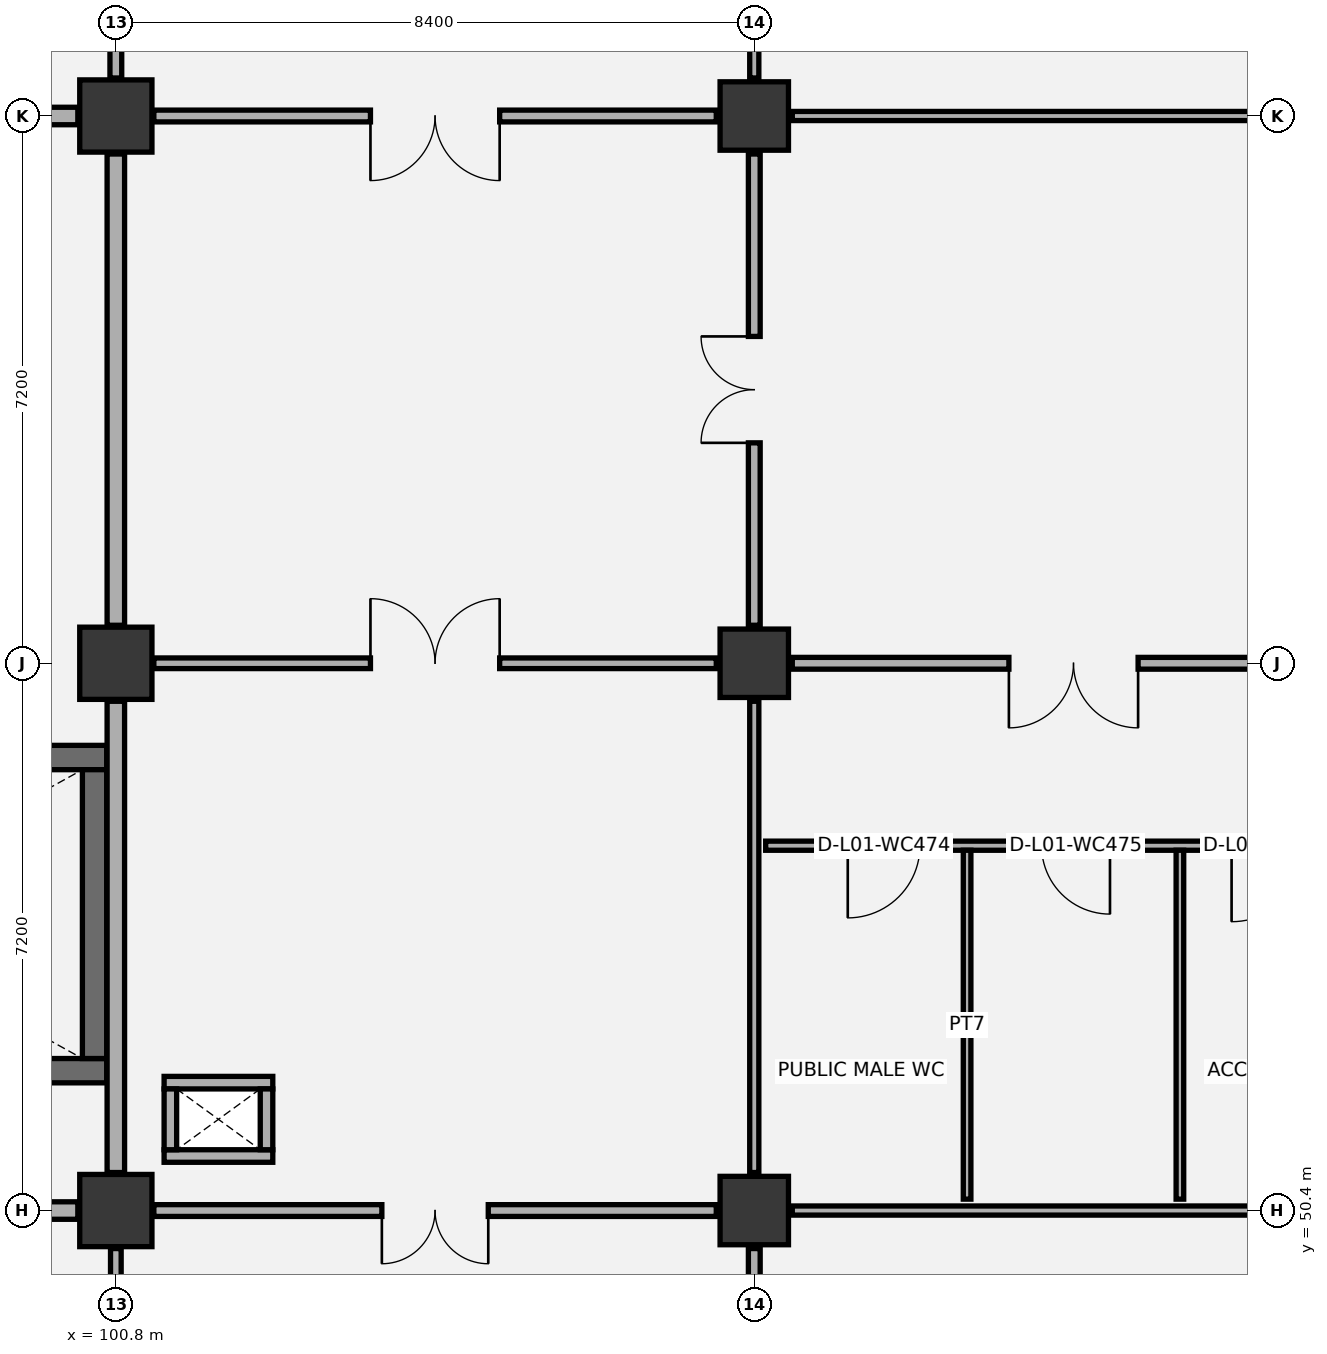
"""IFC4 building model, lengths in metres.
Left out: names, types, materials, properties, quantities, classifications, styles, units other than length and angle.
Written with IfcOpenShell. Run it as: python <this file> out.ifc"""

import sys

from ifc_helpers import new_model, si_unit, direction, frame, frame_2d, origin, origin_2d, place, context, subcontext, project, spatial, rectangle, extrude, element, fill, save


model = new_model("IFC4")
c1 = context("Model", 3, precision=1e-05, world=origin(), true_north=direction((0.0, 1.0)))
c2 = subcontext(c1, "Body", "Model", "MODEL_VIEW")
j1 = project(units=[si_unit("LENGTHUNIT", "METRE"), si_unit("PLANEANGLEUNIT", "RADIAN")], contexts=[c1])
p1 = place(None, origin())
s1 = spatial("IfcSite", under=j1, at=p1, CompositionType="ELEMENT")
p2 = place(p1, origin())
s2 = spatial("IfcBuilding", under=s1, at=p2, CompositionType="ELEMENT")
p3 = place(p2, frame((0.0, 0.0, 6.0)))
s3 = spatial("IfcBuildingStorey", under=s2, at=p3, CompositionType="ELEMENT", Elevation=6.0)
for number, where, z_axis, x_axis in (
    (1, (100.8, 50.4, 0.0), (0.0, 0.0, 1.0), (1.0, 0.0, 0.0)),
    (2, (100.8, 57.6, 0.0), (0.0, 0.0, 1.0), (1.0, 0.0, 0.0)),
    (3, (100.8, 64.8, 0.0), (0.0, 0.0, 1.0), (1.0, 0.0, 0.0)),
):
    element("IfcColumn", number, at=place(p3, frame(where, z_axis=z_axis, x_axis=x_axis)), inside=s3, PredefinedType="COLUMN", context=c2, shape_type="SweptSolid", body=[
        extrude(rectangle(XDim=0.95, YDim=0.95, at=origin_2d()), origin(), (0.0, 0.0, 1.0), 5.4),
    ])
for number, where, z_axis, x_axis in (
    (4, (109.2, 50.4, 0.0), (0.0, 0.0, 1.0), (1.0, 0.0, 0.0)),
    (5, (109.2, 57.6, 0.0), (0.0, 0.0, 1.0), (1.0, 0.0, 0.0)),
    (6, (109.2, 64.8, 0.0), (0.0, 0.0, 1.0), (1.0, 0.0, 0.0)),
):
    element("IfcColumn", number, at=place(p3, frame(where, z_axis=z_axis, x_axis=x_axis)), inside=s3, PredefinedType="COLUMN", context=c2, shape_type="SweptSolid", body=[
        extrude(rectangle(XDim=0.9, YDim=0.9, at=origin_2d()), origin(), (0.0, 0.0, 1.0), 5.4),
    ])
p4 = place(p3, frame((93.2, 52.24, 0.0), z_axis=(0.0, 0.0, 1.0), x_axis=(1.0, 0.0, 0.0)))
e7 = element("IfcWall", 7, at=p4, inside=s3, PredefinedType="SHEAR", context=c2, shape_type="SweptSolid", body=[
    extrude(rectangle(XDim=7.48, YDim=0.32, at=frame_2d((3.74, 0.0))), origin(), (0.0, 0.0, 1.0), 5.075),
])
p5 = place(p4, frame((0.45, 0.0, 0.0)))
e8 = element("IfcOpeningElement", 8, at=p5, cuts=e7, PredefinedType="OPENING", context=c2, shape_type="SweptSolid", body=[
    extrude(rectangle(XDim=1.05, YDim=2.15, at=frame_2d((0.525, 1.075))), frame((0.0, 0.17, 0.0), z_axis=(0.0, -1.0, 0.0), x_axis=(1.0, 0.0, 0.0)), (0.0, 0.0, 1.0), 0.34),
])
p6 = place(p3, frame((93.2, 56.36, 0.0), z_axis=(0.0, 0.0, 1.0), x_axis=(1.0, 0.0, 0.0)))
e9 = element("IfcWall", 9, at=p6, inside=s3, PredefinedType="SHEAR", context=c2, shape_type="SweptSolid", body=[
    extrude(rectangle(XDim=7.48, YDim=0.32, at=frame_2d((3.74, 0.0))), origin(), (0.0, 0.0, 1.0), 5.075),
])
p7 = place(p3, frame((100.52, 52.4, 0.0), z_axis=(0.0, 0.0, 1.0), x_axis=(0.0, 1.0, 0.0)))
e10 = element("IfcWall", 10, at=p7, inside=s3, PredefinedType="SHEAR", context=c2, shape_type="SweptSolid", body=[
    extrude(rectangle(XDim=3.8, YDim=0.32, at=frame_2d((1.9, 0.0))), origin(), (0.0, 0.0, 1.0), 5.075),
])
for number, where, z_axis, x_axis in (
    (11, (101.435, 51.117, 0.0), (0.0, 0.0, 1.0), (1.0, 0.0, 0.0)),
    (12, (101.435, 52.083, 0.0), (0.0, 0.0, 1.0), (1.0, 0.0, 0.0)),
):
    element("IfcWall", number, at=place(p3, frame(where, z_axis=z_axis, x_axis=x_axis)), inside=s3, PredefinedType="PARTITIONING", context=c2, shape_type="SweptSolid", body=[
        extrude(rectangle(XDim=1.43, YDim=0.165, at=frame_2d((0.715, 0.0))), origin(), (0.0, 0.0, 1.0), 5.075),
    ])
for number, where, z_axis, x_axis in (
    (13, (101.518, 51.2, 0.0), (0.0, 0.0, 1.0), (0.0, 1.0, 0.0)),
    (14, (102.782, 51.2, 0.0), (0.0, 0.0, 1.0), (0.0, 1.0, 0.0)),
):
    element("IfcWall", number, at=place(p3, frame(where, z_axis=z_axis, x_axis=x_axis)), inside=s3, PredefinedType="PARTITIONING", context=c2, shape_type="SweptSolid", body=[
        extrude(rectangle(XDim=0.8, YDim=0.165, at=frame_2d((0.4, 0.0))), origin(), (0.0, 0.0, 1.0), 5.075),
    ])
p8 = place(p3, frame((109.35, 55.2, 0.0), z_axis=(0.0, 0.0, 1.0), x_axis=(1.0, 0.0, 0.0)))
e15 = element("IfcWall", 15, at=p8, inside=s3, PredefinedType="PARTITIONING", context=c2, shape_type="SweptSolid", body=[
    extrude(rectangle(XDim=8.1, YDim=0.12, at=frame_2d((4.05, 0.0))), origin(), (0.0, 0.0, 1.0), 5.075),
])
p9 = place(p8, frame((1.08, 0.0, 0.0)))
e16 = element("IfcOpeningElement", 16, at=p9, cuts=e15, PredefinedType="OPENING", context=c2, shape_type="SweptSolid", body=[
    extrude(rectangle(XDim=0.95, YDim=2.1, at=frame_2d((0.475, 1.05))), frame((0.0, 0.07, 0.0), z_axis=(0.0, -1.0, 0.0), x_axis=(1.0, 0.0, 0.0)), (0.0, 0.0, 1.0), 0.14),
])
p10 = place(p8, frame((3.63, 0.0, 0.0)))
e17 = element("IfcOpeningElement", 17, at=p10, cuts=e15, PredefinedType="OPENING", context=c2, shape_type="SweptSolid", body=[
    extrude(rectangle(XDim=0.9, YDim=2.1, at=frame_2d((0.45, 1.05))), frame((0.0, 0.07, 0.0), z_axis=(0.0, -1.0, 0.0), x_axis=(1.0, 0.0, 0.0)), (0.0, 0.0, 1.0), 0.14),
])
p11 = place(p8, frame((6.13, 0.0, 0.0)))
e18 = element("IfcOpeningElement", 18, at=p11, cuts=e15, PredefinedType="OPENING", context=c2, shape_type="SweptSolid", body=[
    extrude(rectangle(XDim=1.0, YDim=2.1, at=frame_2d((0.5, 1.05))), frame((0.0, 0.07, 0.0), z_axis=(0.0, -1.0, 0.0), x_axis=(1.0, 0.0, 0.0)), (0.0, 0.0, 1.0), 0.14),
])
for number, where, z_axis, x_axis in (
    (19, (112.0, 50.55, 0.0), (0.0, 0.0, 1.0), (0.0, 1.0, 0.0)),
    (20, (114.8, 50.55, 0.0), (0.0, 0.0, 1.0), (0.0, 1.0, 0.0)),
):
    element("IfcWall", number, at=place(p3, frame(where, z_axis=z_axis, x_axis=x_axis)), inside=s3, PredefinedType="PARTITIONING", context=c2, shape_type="SweptSolid", body=[
        extrude(rectangle(XDim=4.59, YDim=0.1, at=frame_2d((2.295, 0.0))), origin(), (0.0, 0.0, 1.0), 5.075),
    ])
p12 = place(p3, frame((100.8, 43.7, 0.0), z_axis=(0.0, 0.0, 1.0), x_axis=(0.0, 1.0, 0.0)))
e21 = element("IfcWall", 21, at=p12, inside=s3, PredefinedType="PARTITIONING", context=c2, shape_type="SweptSolid", body=[
    extrude(rectangle(XDim=6.2, YDim=0.14, at=frame_2d((3.1, 0.0))), origin(), (0.0, 0.0, 1.0), 4.32),
])
p13 = place(p12, frame((2.4, 0.0, 0.0)))
e22 = element("IfcOpeningElement", 22, at=p13, cuts=e21, PredefinedType="OPENING", context=c2, shape_type="SweptSolid", body=[
    extrude(rectangle(XDim=1.4, YDim=2.15, at=frame_2d((0.7, 1.075))), frame((0.0, 0.08, 0.0), z_axis=(0.0, -1.0, 0.0), x_axis=(1.0, 0.0, 0.0)), (0.0, 0.0, 1.0), 0.16),
])
p14 = place(p3, frame((92.9, 50.4, 0.0), z_axis=(0.0, 0.0, 1.0), x_axis=(1.0, 0.0, 0.0)))
e23 = element("IfcWall", 23, at=p14, inside=s3, PredefinedType="PARTITIONING", context=c2, shape_type="SweptSolid", body=[
    extrude(rectangle(XDim=7.4, YDim=0.23, at=frame_2d((3.7, 0.0))), origin(), (0.0, 0.0, 1.0), 4.27),
])
p15 = place(p14, frame((2.95, 0.0, 0.0)))
e24 = element("IfcOpeningElement", 24, at=p15, cuts=e23, PredefinedType="OPENING", context=c2, shape_type="SweptSolid", body=[
    extrude(rectangle(XDim=1.5, YDim=2.15, at=frame_2d((0.75, 1.075))), frame((0.0, 0.125, 0.0), z_axis=(0.0, -1.0, 0.0), x_axis=(1.0, 0.0, 0.0)), (0.0, 0.0, 1.0), 0.25),
])
p16 = place(p3, frame((100.8, 50.9, 0.0), z_axis=(0.0, 0.0, 1.0), x_axis=(0.0, 1.0, 0.0)))
e25 = element("IfcWall", 25, at=p16, inside=s3, PredefinedType="PARTITIONING", context=c2, shape_type="SweptSolid", body=[
    extrude(rectangle(XDim=6.2, YDim=0.23, at=frame_2d((3.1, 0.0))), origin(), (0.0, 0.0, 1.0), 4.78),
])
p17 = place(p3, frame((100.8, 58.1, 0.0), z_axis=(0.0, 0.0, 1.0), x_axis=(0.0, 1.0, 0.0)))
e26 = element("IfcWall", 26, at=p17, inside=s3, PredefinedType="PARTITIONING", context=c2, shape_type="SweptSolid", body=[
    extrude(rectangle(XDim=6.2, YDim=0.23, at=frame_2d((3.1, 0.0))), origin(), (0.0, 0.0, 1.0), 4.32),
])
p18 = place(p3, frame((92.9, 64.8, 0.0), z_axis=(0.0, 0.0, 1.0), x_axis=(1.0, 0.0, 0.0)))
e27 = element("IfcWall", 27, at=p18, inside=s3, PredefinedType="PARTITIONING", context=c2, shape_type="SweptSolid", body=[
    extrude(rectangle(XDim=7.4, YDim=0.23, at=frame_2d((3.7, 0.0))), origin(), (0.0, 0.0, 1.0), 4.27),
])
p19 = place(p3, frame((100.8, 65.3, 0.0), z_axis=(0.0, 0.0, 1.0), x_axis=(0.0, 1.0, 0.0)))
e28 = element("IfcWall", 28, at=p19, inside=s3, PredefinedType="PARTITIONING", context=c2, shape_type="SweptSolid", body=[
    extrude(rectangle(XDim=6.2, YDim=0.155, at=frame_2d((3.1, 0.0))), origin(), (0.0, 0.0, 1.0), 4.57),
])
p20 = place(p19, frame((2.4, 0.0, 0.0)))
e29 = element("IfcOpeningElement", 29, at=p20, cuts=e28, PredefinedType="OPENING", context=c2, shape_type="SweptSolid", body=[
    extrude(rectangle(XDim=1.4, YDim=2.15, at=frame_2d((0.7, 1.075))), frame((0.0, 0.087, 0.0), z_axis=(0.0, -1.0, 0.0), x_axis=(1.0, 0.0, 0.0)), (0.0, 0.0, 1.0), 0.175),
])
p21 = place(p3, frame((109.2, 43.7, 0.0), z_axis=(0.0, 0.0, 1.0), x_axis=(0.0, 1.0, 0.0)))
e30 = element("IfcWall", 30, at=p21, inside=s3, PredefinedType="PARTITIONING", context=c2, shape_type="SweptSolid", body=[
    extrude(rectangle(XDim=6.2, YDim=0.155, at=frame_2d((3.1, 0.0))), origin(), (0.0, 0.0, 1.0), 4.78),
])
p22 = place(p21, frame((2.25, 0.0, 0.0)))
e31 = element("IfcOpeningElement", 31, at=p22, cuts=e30, PredefinedType="OPENING", context=c2, shape_type="SweptSolid", body=[
    extrude(rectangle(XDim=1.7, YDim=2.25, at=frame_2d((0.85, 1.125))), frame((0.0, 0.087, 0.0), z_axis=(0.0, -1.0, 0.0), x_axis=(1.0, 0.0, 0.0)), (0.0, 0.0, 1.0), 0.175),
])
p23 = place(p3, frame((101.3, 50.4, 0.0), z_axis=(0.0, 0.0, 1.0), x_axis=(1.0, 0.0, 0.0)))
e32 = element("IfcWall", 32, at=p23, inside=s3, PredefinedType="PARTITIONING", context=c2, shape_type="SweptSolid", body=[
    extrude(rectangle(XDim=7.4, YDim=0.155, at=frame_2d((3.7, 0.0))), origin(), (0.0, 0.0, 1.0), 4.27),
])
p24 = place(p23, frame((3.0, 0.0, 0.0)))
e33 = element("IfcOpeningElement", 33, at=p24, cuts=e32, PredefinedType="OPENING", context=c2, shape_type="SweptSolid", body=[
    extrude(rectangle(XDim=1.4, YDim=2.15, at=frame_2d((0.7, 1.075))), frame((0.0, 0.087, 0.0), z_axis=(0.0, -1.0, 0.0), x_axis=(1.0, 0.0, 0.0)), (0.0, 0.0, 1.0), 0.175),
])
p25 = place(p3, frame((109.2, 50.9, 0.0), z_axis=(0.0, 0.0, 1.0), x_axis=(0.0, 1.0, 0.0)))
e34 = element("IfcWall", 34, at=p25, inside=s3, PredefinedType="PARTITIONING", context=c2, shape_type="SweptSolid", body=[
    extrude(rectangle(XDim=6.2, YDim=0.12, at=frame_2d((3.1, 0.0))), origin(), (0.0, 0.0, 1.0), 4.32),
])
p26 = place(p3, frame((101.3, 57.6, 0.0), z_axis=(0.0, 0.0, 1.0), x_axis=(1.0, 0.0, 0.0)))
e35 = element("IfcWall", 35, at=p26, inside=s3, PredefinedType="PARTITIONING", context=c2, shape_type="SweptSolid", body=[
    extrude(rectangle(XDim=7.4, YDim=0.14, at=frame_2d((3.7, 0.0))), origin(), (0.0, 0.0, 1.0), 4.27),
])
p27 = place(p26, frame((2.85, 0.0, 0.0)))
e36 = element("IfcOpeningElement", 36, at=p27, cuts=e35, PredefinedType="OPENING", context=c2, shape_type="SweptSolid", body=[
    extrude(rectangle(XDim=1.7, YDim=2.25, at=frame_2d((0.85, 1.125))), frame((0.0, 0.08, 0.0), z_axis=(0.0, -1.0, 0.0), x_axis=(1.0, 0.0, 0.0)), (0.0, 0.0, 1.0), 0.16),
])
p28 = place(p3, frame((109.2, 58.1, 0.0), z_axis=(0.0, 0.0, 1.0), x_axis=(0.0, 1.0, 0.0)))
e37 = element("IfcWall", 37, at=p28, inside=s3, PredefinedType="PARTITIONING", context=c2, shape_type="SweptSolid", body=[
    extrude(rectangle(XDim=6.2, YDim=0.155, at=frame_2d((3.1, 0.0))), origin(), (0.0, 0.0, 1.0), 4.57),
])
p29 = place(p28, frame((2.4, 0.0, 0.0)))
e38 = element("IfcOpeningElement", 38, at=p29, cuts=e37, PredefinedType="OPENING", context=c2, shape_type="SweptSolid", body=[
    extrude(rectangle(XDim=1.4, YDim=2.15, at=frame_2d((0.7, 1.075))), frame((0.0, 0.087, 0.0), z_axis=(0.0, -1.0, 0.0), x_axis=(1.0, 0.0, 0.0)), (0.0, 0.0, 1.0), 0.175),
])
p30 = place(p3, frame((101.3, 64.8, 0.0), z_axis=(0.0, 0.0, 1.0), x_axis=(1.0, 0.0, 0.0)))
e39 = element("IfcWall", 39, at=p30, inside=s3, PredefinedType="PARTITIONING", context=c2, shape_type="SweptSolid", body=[
    extrude(rectangle(XDim=7.4, YDim=0.155, at=frame_2d((3.7, 0.0))), origin(), (0.0, 0.0, 1.0), 4.27),
])
p31 = place(p30, frame((2.85, 0.0, 0.0)))
e40 = element("IfcOpeningElement", 40, at=p31, cuts=e39, PredefinedType="OPENING", context=c2, shape_type="SweptSolid", body=[
    extrude(rectangle(XDim=1.7, YDim=2.25, at=frame_2d((0.85, 1.125))), frame((0.0, 0.087, 0.0), z_axis=(0.0, -1.0, 0.0), x_axis=(1.0, 0.0, 0.0)), (0.0, 0.0, 1.0), 0.175),
])
p32 = place(p3, frame((109.2, 65.3, 0.0), z_axis=(0.0, 0.0, 1.0), x_axis=(0.0, 1.0, 0.0)))
e41 = element("IfcWall", 41, at=p32, inside=s3, PredefinedType="PARTITIONING", context=c2, shape_type="SweptSolid", body=[
    extrude(rectangle(XDim=6.2, YDim=0.12, at=frame_2d((3.1, 0.0))), origin(), (0.0, 0.0, 1.0), 4.32),
])
p33 = place(p3, frame((109.7, 50.4, 0.0), z_axis=(0.0, 0.0, 1.0), x_axis=(1.0, 0.0, 0.0)))
e42 = element("IfcWall", 42, at=p33, inside=s3, PredefinedType="PARTITIONING", context=c2, shape_type="SweptSolid", body=[
    extrude(rectangle(XDim=7.4, YDim=0.12, at=frame_2d((3.7, 0.0))), origin(), (0.0, 0.0, 1.0), 4.27),
])
p34 = place(p3, frame((109.7, 57.6, 0.0), z_axis=(0.0, 0.0, 1.0), x_axis=(1.0, 0.0, 0.0)))
e43 = element("IfcWall", 43, at=p34, inside=s3, PredefinedType="PARTITIONING", context=c2, shape_type="SweptSolid", body=[
    extrude(rectangle(XDim=7.4, YDim=0.155, at=frame_2d((3.7, 0.0))), origin(), (0.0, 0.0, 1.0), 4.27),
])
p35 = place(p34, frame((2.85, 0.0, 0.0)))
e44 = element("IfcOpeningElement", 44, at=p35, cuts=e43, PredefinedType="OPENING", context=c2, shape_type="SweptSolid", body=[
    extrude(rectangle(XDim=1.7, YDim=2.25, at=frame_2d((0.85, 1.125))), frame((0.0, 0.087, 0.0), z_axis=(0.0, -1.0, 0.0), x_axis=(1.0, 0.0, 0.0)), (0.0, 0.0, 1.0), 0.175),
])
p36 = place(p3, frame((109.7, 64.8, 0.0), z_axis=(0.0, 0.0, 1.0), x_axis=(1.0, 0.0, 0.0)))
e45 = element("IfcWall", 45, at=p36, inside=s3, PredefinedType="PARTITIONING", context=c2, shape_type="SweptSolid", body=[
    extrude(rectangle(XDim=7.4, YDim=0.12, at=frame_2d((3.7, 0.0))), origin(), (0.0, 0.0, 1.0), 4.27),
])
p37 = place(p9, frame((0.95, 0.0, 0.0), z_axis=(0.0, 0.0, 1.0), x_axis=(-1.0, 0.0, 0.0)))
e46 = element("IfcDoor", 46, at=p37, inside=s3, OperationType="SINGLE_SWING_RIGHT", PredefinedType="DOOR", context=c2, shape_type="SweptSolid", body=[
    extrude(rectangle(XDim=0.95, YDim=2.1, at=frame_2d((0.475, 1.05))), frame((0.0, 0.025, 0.0), z_axis=(0.0, -1.0, 0.0), x_axis=(1.0, 0.0, 0.0)), (0.0, 0.0, 1.0), 0.05),
])
fill(e16, e46)
p38 = place(p10, frame((0.9, 0.0, 0.0), z_axis=(0.0, 0.0, 1.0), x_axis=(-1.0, 0.0, 0.0)))
e47 = element("IfcDoor", 47, at=p38, inside=s3, OperationType="SINGLE_SWING_LEFT", PredefinedType="DOOR", context=c2, shape_type="SweptSolid", body=[
    extrude(rectangle(XDim=0.9, YDim=2.1, at=frame_2d((0.45, 1.05))), frame((0.0, 0.025, 0.0), z_axis=(0.0, -1.0, 0.0), x_axis=(1.0, 0.0, 0.0)), (0.0, 0.0, 1.0), 0.05),
])
fill(e17, e47)
p39 = place(p11, frame((1.0, 0.0, 0.0), z_axis=(0.0, 0.0, 1.0), x_axis=(-1.0, 0.0, 0.0)))
e48 = element("IfcDoor", 48, at=p39, inside=s3, OperationType="SINGLE_SWING_RIGHT", PredefinedType="DOOR", context=c2, shape_type="SweptSolid", body=[
    extrude(rectangle(XDim=1.0, YDim=2.1, at=frame_2d((0.5, 1.05))), frame((0.0, 0.025, 0.0), z_axis=(0.0, -1.0, 0.0), x_axis=(1.0, 0.0, 0.0)), (0.0, 0.0, 1.0), 0.05),
])
fill(e18, e48)
p40 = place(p24, frame((1.4, 0.0, 0.0), z_axis=(0.0, 0.0, 1.0), x_axis=(-1.0, 0.0, 0.0)))
e49 = element("IfcDoor", 49, at=p40, inside=s3, OperationType="DOUBLE_DOOR_SINGLE_SWING", PredefinedType="DOOR", context=c2, shape_type="SweptSolid", body=[
    extrude(rectangle(XDim=1.4, YDim=2.15, at=frame_2d((0.7, 1.075))), frame((0.0, 0.025, 0.0), z_axis=(0.0, -1.0, 0.0), x_axis=(1.0, 0.0, 0.0)), (0.0, 0.0, 1.0), 0.05),
])
fill(e33, e49)
p41 = place(p27, origin())
e50 = element("IfcDoor", 50, at=p41, inside=s3, OperationType="DOUBLE_DOOR_SINGLE_SWING", PredefinedType="DOOR", context=c2, shape_type="SweptSolid", body=[
    extrude(rectangle(XDim=1.7, YDim=2.25, at=frame_2d((0.85, 1.125))), frame((0.0, 0.025, 0.0), z_axis=(0.0, -1.0, 0.0), x_axis=(1.0, 0.0, 0.0)), (0.0, 0.0, 1.0), 0.05),
])
fill(e36, e50)
p42 = place(p29, origin())
e51 = element("IfcDoor", 51, at=p42, inside=s3, OperationType="DOUBLE_DOOR_SINGLE_SWING", PredefinedType="DOOR", context=c2, shape_type="SweptSolid", body=[
    extrude(rectangle(XDim=1.4, YDim=2.15, at=frame_2d((0.7, 1.075))), frame((0.0, 0.025, 0.0), z_axis=(0.0, -1.0, 0.0), x_axis=(1.0, 0.0, 0.0)), (0.0, 0.0, 1.0), 0.05),
])
fill(e38, e51)
p43 = place(p31, frame((1.7, 0.0, 0.0), z_axis=(0.0, 0.0, 1.0), x_axis=(-1.0, 0.0, 0.0)))
e52 = element("IfcDoor", 52, at=p43, inside=s3, OperationType="DOUBLE_DOOR_SINGLE_SWING", PredefinedType="DOOR", context=c2, shape_type="SweptSolid", body=[
    extrude(rectangle(XDim=1.7, YDim=2.25, at=frame_2d((0.85, 1.125))), frame((0.0, 0.025, 0.0), z_axis=(0.0, -1.0, 0.0), x_axis=(1.0, 0.0, 0.0)), (0.0, 0.0, 1.0), 0.05),
])
fill(e40, e52)
p44 = place(p35, frame((1.7, 0.0, 0.0), z_axis=(0.0, 0.0, 1.0), x_axis=(-1.0, 0.0, 0.0)))
e53 = element("IfcDoor", 53, at=p44, inside=s3, OperationType="DOUBLE_DOOR_SINGLE_SWING", PredefinedType="DOOR", context=c2, shape_type="SweptSolid", body=[
    extrude(rectangle(XDim=1.7, YDim=2.25, at=frame_2d((0.85, 1.125))), frame((0.0, 0.025, 0.0), z_axis=(0.0, -1.0, 0.0), x_axis=(1.0, 0.0, 0.0)), (0.0, 0.0, 1.0), 0.05),
])
fill(e44, e53)
save(model, sys.argv[1])
